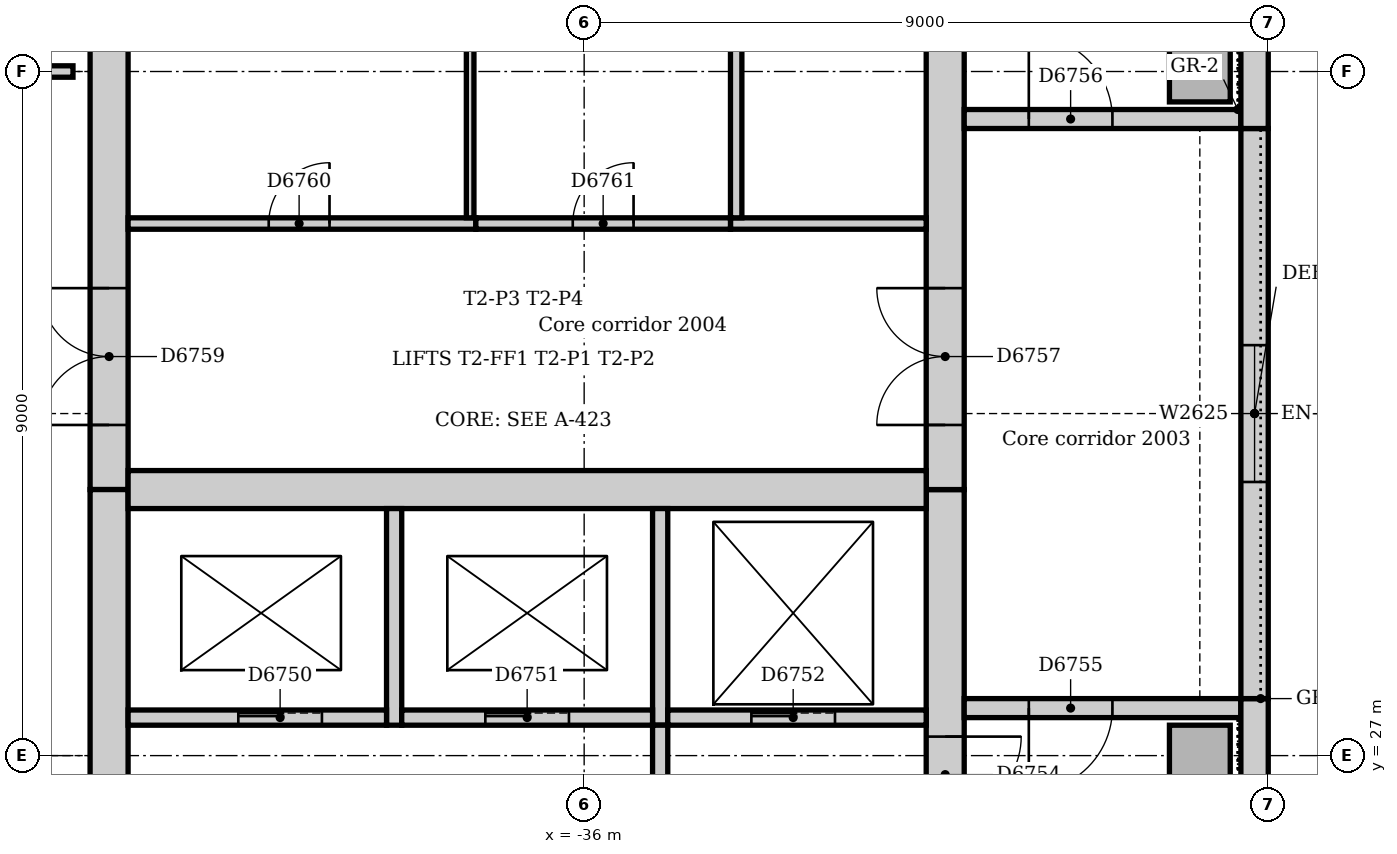
"""IFC4 building model, lengths in metres.
Left out: names, types, materials, properties, quantities, classifications, styles, units other than length and angle.
Written with IfcOpenShell. Run it as: python <this file> out.ifc"""

import sys

from ifc_helpers import new_model, si_unit, direction, frame, frame_2d, origin, origin_2d, place, context, subcontext, project, spatial, rectangle, extrude, element, fill, save


model = new_model("IFC4")
c1 = context("Model", 3, precision=1e-05, world=origin(), true_north=direction((0.0, 1.0)))
c2 = subcontext(c1, "Body", "Model", "MODEL_VIEW")
j1 = project(units=[si_unit("LENGTHUNIT", "METRE"), si_unit("PLANEANGLEUNIT", "RADIAN")], contexts=[c1])
p1 = place(None, origin())
s1 = spatial("IfcSite", under=j1, at=p1, CompositionType="ELEMENT")
p2 = place(p1, origin())
s2 = spatial("IfcBuilding", under=s1, at=p2, CompositionType="ELEMENT")
p3 = place(p2, frame((0.0, 0.0, 87.0)))
s3 = spatial("IfcBuildingStorey", under=s2, at=p3, CompositionType="ELEMENT", Elevation=87.0)
p4 = place(p3, frame((-31.25, 21.0, 0.0), z_axis=(0.0, 0.0, 1.0), x_axis=(0.0, 1.0, 0.0)))
e1 = element("IfcWall", 1, at=p4, inside=s3, PredefinedType="SOLIDWALL", context=c2, shape_type="SweptSolid", body=[
    extrude(rectangle(XDim=9.5, YDim=0.5, at=frame_2d((4.75, 0.0))), origin(), (0.0, 0.0, 1.0), 4.0),
])
p5 = place(p4, frame((5.25, 0.0, 0.0)))
e2 = element("IfcOpeningElement", 2, at=p5, cuts=e1, PredefinedType="OPENING", context=c2, shape_type="SweptSolid", body=[
    extrude(rectangle(XDim=1.0, YDim=2.1, at=frame_2d((0.5, 1.05))), frame((0.0, 0.26, 0.0), z_axis=(0.0, -1.0, 0.0), x_axis=(1.0, 0.0, 0.0)), (0.0, 0.0, 1.0), 0.52),
])
p6 = place(p3, frame((-31.25, 30.5, 0.0), z_axis=(0.0, 0.0, 1.0), x_axis=(0.0, 1.0, 0.0)))
e3 = element("IfcWall", 3, at=p6, inside=s3, PredefinedType="SOLIDWALL", context=c2, shape_type="SweptSolid", body=[
    extrude(rectangle(XDim=11.5, YDim=0.5, at=frame_2d((5.75, 0.0))), origin(), (0.0, 0.0, 1.0), 4.0),
])
p7 = place(p6, frame((0.85, 0.0, 0.0)))
e4 = element("IfcOpeningElement", 4, at=p7, cuts=e3, PredefinedType="OPENING", context=c2, shape_type="SweptSolid", body=[
    extrude(rectangle(XDim=1.8, YDim=2.1, at=frame_2d((0.9, 1.05))), frame((0.0, 0.26, 0.0), z_axis=(0.0, -1.0, 0.0), x_axis=(1.0, 0.0, 0.0)), (0.0, 0.0, 1.0), 0.52),
])
p8 = place(p3, frame((-42.25, 42.0, 0.0), z_axis=(0.0, 0.0, 1.0), x_axis=(0.0, -1.0, 0.0)))
e5 = element("IfcWall", 5, at=p8, inside=s3, PredefinedType="SOLIDWALL", context=c2, shape_type="SweptSolid", body=[
    extrude(rectangle(XDim=11.5, YDim=0.5, at=frame_2d((5.75, 0.0))), origin(), (0.0, 0.0, 1.0), 4.0),
])
p9 = place(p8, frame((8.85, 0.0, 0.0)))
e6 = element("IfcOpeningElement", 6, at=p9, cuts=e5, PredefinedType="OPENING", context=c2, shape_type="SweptSolid", body=[
    extrude(rectangle(XDim=1.8, YDim=2.1, at=frame_2d((0.9, 1.05))), frame((0.0, 0.26, 0.0), z_axis=(0.0, -1.0, 0.0), x_axis=(1.0, 0.0, 0.0)), (0.0, 0.0, 1.0), 0.52),
])
p10 = place(p3, frame((-42.25, 30.5, 0.0), z_axis=(0.0, 0.0, 1.0), x_axis=(0.0, -1.0, 0.0)))
e7 = element("IfcWall", 7, at=p10, inside=s3, PredefinedType="SOLIDWALL", context=c2, shape_type="SweptSolid", body=[
    extrude(rectangle(XDim=9.5, YDim=0.5, at=frame_2d((4.75, 0.0))), origin(), (0.0, 0.0, 1.0), 4.0),
])
p11 = place(p10, frame((3.85, 0.0, 0.0)))
e8 = element("IfcOpeningElement", 8, at=p11, cuts=e7, PredefinedType="OPENING", context=c2, shape_type="SweptSolid", body=[
    extrude(rectangle(XDim=1.8, YDim=2.1, at=frame_2d((0.9, 1.05))), frame((0.0, 0.26, 0.0), z_axis=(0.0, -1.0, 0.0), x_axis=(1.0, 0.0, 0.0)), (0.0, 0.0, 1.0), 0.52),
])
p12 = place(p3, frame((-42.0, 30.5, 0.0), z_axis=(0.0, 0.0, 1.0), x_axis=(1.0, 0.0, 0.0)))
e9 = element("IfcWall", 9, at=p12, inside=s3, PredefinedType="SOLIDWALL", context=c2, shape_type="SweptSolid", body=[
    extrude(rectangle(XDim=10.5, YDim=0.5, at=frame_2d((5.25, 0.0))), origin(), (0.0, 0.0, 1.0), 4.0),
])
p13 = place(p3, frame((-27.36, 27.625, 0.0), z_axis=(0.0, 0.0, 1.0), x_axis=(-1.0, 0.0, 0.0)))
e10 = element("IfcWall", 10, at=p13, inside=s3, PredefinedType="SOLIDWALL", context=c2, shape_type="SweptSolid", body=[
    extrude(rectangle(XDim=3.64, YDim=0.25, at=frame_2d((1.82, 0.0))), origin(), (0.0, 0.0, 1.0), 4.0),
])
p14 = place(p13, frame((1.69, 0.0, 0.0)))
e11 = element("IfcOpeningElement", 11, at=p14, cuts=e10, PredefinedType="OPENING", context=c2, shape_type="SweptSolid", body=[
    extrude(rectangle(XDim=1.1, YDim=2.1, at=frame_2d((0.55, 1.05))), frame((0.0, 0.135, 0.0), z_axis=(0.0, -1.0, 0.0), x_axis=(1.0, 0.0, 0.0)), (0.0, 0.0, 1.0), 0.27),
])
p15 = place(p3, frame((-31.0, 35.375, 0.0), z_axis=(0.0, 0.0, 1.0), x_axis=(1.0, 0.0, 0.0)))
e12 = element("IfcWall", 12, at=p15, inside=s3, PredefinedType="SOLIDWALL", context=c2, shape_type="SweptSolid", body=[
    extrude(rectangle(XDim=3.64, YDim=0.25, at=frame_2d((1.82, 0.0))), origin(), (0.0, 0.0, 1.0), 4.0),
])
p16 = place(p15, frame((0.85, 0.0, 0.0)))
e13 = element("IfcOpeningElement", 13, at=p16, cuts=e12, PredefinedType="OPENING", context=c2, shape_type="SweptSolid", body=[
    extrude(rectangle(XDim=1.1, YDim=2.1, at=frame_2d((0.55, 1.05))), frame((0.0, 0.135, 0.0), z_axis=(0.0, -1.0, 0.0), x_axis=(1.0, 0.0, 0.0)), (0.0, 0.0, 1.0), 0.27),
])
for number, where, z_axis, x_axis in (
    (14, (-27.9, 27.0, 0.0), (0.0, 0.0, 1.0), (1.0, 0.0, 0.0)),
    (15, (-27.9, 36.0, 0.0), (0.0, 0.0, 1.0), (1.0, 0.0, 0.0)),
):
    element("IfcColumn", number, at=place(p3, frame(where, z_axis=z_axis, x_axis=x_axis)), inside=s3, PredefinedType="COLUMN", context=c2, shape_type="SweptSolid", body=[
        extrude(rectangle(XDim=0.8, YDim=0.8, at=origin_2d()), origin(), (0.0, 0.0, 1.0), 4.0),
    ])
p17 = place(p3, frame((-27.18, 21.0, 0.0), z_axis=(0.0, 0.0, 1.0), x_axis=(0.0, 1.0, 0.0)))
e16 = element("IfcWall", 16, at=p17, inside=s3, PredefinedType="STANDARD", context=c2, shape_type="SweptSolid", body=[
    extrude(rectangle(XDim=6.75, YDim=0.36, at=frame_2d((3.375, 0.0))), origin(), (0.0, 0.0, 1.0), 3.85),
])
p18 = place(p3, frame((-27.18, 27.75, 0.0), z_axis=(0.0, 0.0, 1.0), x_axis=(0.0, 1.0, 0.0)))
e17 = element("IfcWall", 17, at=p18, inside=s3, PredefinedType="STANDARD", context=c2, shape_type="SweptSolid", body=[
    extrude(rectangle(XDim=7.5, YDim=0.36, at=frame_2d((3.75, 0.0))), origin(), (0.0, 0.0, 1.0), 3.85),
])
p19 = place(p18, frame((2.85, 0.0, 1.2)))
e18 = element("IfcOpeningElement", 18, at=p19, cuts=e17, PredefinedType="OPENING", context=c2, shape_type="SweptSolid", body=[
    extrude(rectangle(XDim=1.8, YDim=1.2, at=frame_2d((0.9, 0.6))), frame((0.0, 0.19, 0.0), z_axis=(0.0, -1.0, 0.0), x_axis=(1.0, 0.0, 0.0)), (0.0, 0.0, 1.0), 0.38),
])
p20 = place(p3, frame((-27.18, 35.25, 0.0), z_axis=(0.0, 0.0, 1.0), x_axis=(0.0, 1.0, 0.0)))
e19 = element("IfcWall", 19, at=p20, inside=s3, PredefinedType="STANDARD", context=c2, shape_type="SweptSolid", body=[
    extrude(rectangle(XDim=6.75, YDim=0.36, at=frame_2d((3.375, 0.0))), origin(), (0.0, 0.0, 1.0), 3.85),
])
p21 = place(p3, frame((-38.5, 27.4, 0.0), z_axis=(0.0, 0.0, 1.0), x_axis=(0.0, 1.0, 0.0)))
e20 = element("IfcWall", 20, at=p21, inside=s3, PredefinedType="SOLIDWALL", context=c2, shape_type="SweptSolid", body=[
    extrude(rectangle(XDim=2.85, YDim=0.2, at=frame_2d((1.425, 0.0))), origin(), (0.0, 0.0, 1.0), 4.0),
])
p22 = place(p3, frame((-42.0, 27.5, 0.0), z_axis=(0.0, 0.0, 1.0), x_axis=(1.0, 0.0, 0.0)))
e21 = element("IfcWall", 21, at=p22, inside=s3, PredefinedType="SOLIDWALL", context=c2, shape_type="SweptSolid", body=[
    extrude(rectangle(XDim=3.4, YDim=0.2, at=frame_2d((1.7, 0.0))), origin(), (0.0, 0.0, 1.0), 4.0),
])
p23 = place(p22, frame((1.45, 0.0, 0.0)))
e22 = element("IfcOpeningElement", 22, at=p23, cuts=e21, PredefinedType="OPENING", context=c2, shape_type="SweptSolid", body=[
    extrude(rectangle(XDim=1.1, YDim=2.1, at=frame_2d((0.55, 1.05))), frame((0.0, 0.11, 0.0), z_axis=(0.0, -1.0, 0.0), x_axis=(1.0, 0.0, 0.0)), (0.0, 0.0, 1.0), 0.22),
])
p24 = place(p3, frame((-35.0, 27.4, 0.0), z_axis=(0.0, 0.0, 1.0), x_axis=(0.0, 1.0, 0.0)))
e23 = element("IfcWall", 23, at=p24, inside=s3, PredefinedType="SOLIDWALL", context=c2, shape_type="SweptSolid", body=[
    extrude(rectangle(XDim=2.85, YDim=0.2, at=frame_2d((1.425, 0.0))), origin(), (0.0, 0.0, 1.0), 4.0),
])
p25 = place(p3, frame((-38.4, 27.5, 0.0), z_axis=(0.0, 0.0, 1.0), x_axis=(1.0, 0.0, 0.0)))
e24 = element("IfcWall", 24, at=p25, inside=s3, PredefinedType="SOLIDWALL", context=c2, shape_type="SweptSolid", body=[
    extrude(rectangle(XDim=3.3, YDim=0.2, at=frame_2d((1.65, 0.0))), origin(), (0.0, 0.0, 1.0), 4.0),
])
p26 = place(p25, frame((1.1, 0.0, 0.0)))
e25 = element("IfcOpeningElement", 25, at=p26, cuts=e24, PredefinedType="OPENING", context=c2, shape_type="SweptSolid", body=[
    extrude(rectangle(XDim=1.1, YDim=2.1, at=frame_2d((0.55, 1.05))), frame((0.0, 0.11, 0.0), z_axis=(0.0, -1.0, 0.0), x_axis=(1.0, 0.0, 0.0)), (0.0, 0.0, 1.0), 0.22),
])
p27 = place(p3, frame((-34.9, 27.5, 0.0), z_axis=(0.0, 0.0, 1.0), x_axis=(1.0, 0.0, 0.0)))
e26 = element("IfcWall", 26, at=p27, inside=s3, PredefinedType="SOLIDWALL", context=c2, shape_type="SweptSolid", body=[
    extrude(rectangle(XDim=3.4, YDim=0.2, at=frame_2d((1.7, 0.0))), origin(), (0.0, 0.0, 1.0), 4.0),
])
p28 = place(p27, frame((1.1, 0.0, 0.0)))
e27 = element("IfcOpeningElement", 27, at=p28, cuts=e26, PredefinedType="OPENING", context=c2, shape_type="SweptSolid", body=[
    extrude(rectangle(XDim=1.1, YDim=2.1, at=frame_2d((0.55, 1.05))), frame((0.0, 0.11, 0.0), z_axis=(0.0, -1.0, 0.0), x_axis=(1.0, 0.0, 0.0)), (0.0, 0.0, 1.0), 0.22),
])
p29 = place(p3, frame((-35.0, 24.1, 0.0), z_axis=(0.0, 0.0, 1.0), x_axis=(0.0, 1.0, 0.0)))
e28 = element("IfcWall", 28, at=p29, inside=s3, PredefinedType="SOLIDWALL", context=c2, shape_type="SweptSolid", body=[
    extrude(rectangle(XDim=3.3, YDim=0.2, at=frame_2d((1.65, 0.0))), origin(), (0.0, 0.0, 1.0), 4.0),
])
p30 = place(p29, frame((1.15, 0.0, 0.0)))
e29 = element("IfcOpeningElement", 29, at=p30, cuts=e28, PredefinedType="OPENING", context=c2, shape_type="SweptSolid", body=[
    extrude(rectangle(XDim=1.0, YDim=2.1, at=frame_2d((0.5, 1.05))), frame((0.0, 0.11, 0.0), z_axis=(0.0, -1.0, 0.0), x_axis=(1.0, 0.0, 0.0)), (0.0, 0.0, 1.0), 0.22),
])
p31 = place(p3, frame((-34.075, 34.0, 0.0), z_axis=(0.0, 0.0, 1.0), x_axis=(1.0, 0.0, 0.0)))
e30 = element("IfcWall", 30, at=p31, inside=s3, PredefinedType="SOLIDWALL", context=c2, shape_type="SweptSolid", body=[
    extrude(rectangle(XDim=2.575, YDim=0.15, at=frame_2d((1.288, 0.0))), origin(), (0.0, 0.0, 1.0), 4.0),
])
p32 = place(p3, frame((-34.0, 41.075, 0.0), z_axis=(0.0, 0.0, 1.0), x_axis=(0.0, -1.0, 0.0)))
e31 = element("IfcWall", 31, at=p32, inside=s3, PredefinedType="SOLIDWALL", context=c2, shape_type="SweptSolid", body=[
    extrude(rectangle(XDim=7.0, YDim=0.15, at=frame_2d((3.5, 0.0))), origin(), (0.0, 0.0, 1.0), 4.0),
])
p33 = place(p3, frame((-37.425, 34.0, 0.0), z_axis=(0.0, 0.0, 1.0), x_axis=(-1.0, 0.0, 0.0)))
e32 = element("IfcWall", 32, at=p33, inside=s3, PredefinedType="PARTITIONING", context=c2, shape_type="SweptSolid", body=[
    extrude(rectangle(XDim=4.575, YDim=0.15, at=frame_2d((2.288, 0.0))), origin(), (0.0, 0.0, 1.0), 3.85),
])
p34 = place(p33, frame((1.925, 0.0, 0.0)))
e33 = element("IfcOpeningElement", 33, at=p34, cuts=e32, PredefinedType="OPENING", context=c2, shape_type="SweptSolid", body=[
    extrude(rectangle(XDim=0.8, YDim=2.1, at=frame_2d((0.4, 1.05))), frame((0.0, 0.085, 0.0), z_axis=(0.0, -1.0, 0.0), x_axis=(1.0, 0.0, 0.0)), (0.0, 0.0, 1.0), 0.17),
])
p35 = place(p3, frame((-34.075, 34.0, 0.0), z_axis=(0.0, 0.0, 1.0), x_axis=(-1.0, 0.0, 0.0)))
e34 = element("IfcWall", 34, at=p35, inside=s3, PredefinedType="PARTITIONING", context=c2, shape_type="SweptSolid", body=[
    extrude(rectangle(XDim=3.35, YDim=0.15, at=frame_2d((1.675, 0.0))), origin(), (0.0, 0.0, 1.0), 3.85),
])
p36 = place(p35, frame((1.275, 0.0, 0.0)))
e35 = element("IfcOpeningElement", 35, at=p36, cuts=e34, PredefinedType="OPENING", context=c2, shape_type="SweptSolid", body=[
    extrude(rectangle(XDim=0.8, YDim=2.1, at=frame_2d((0.4, 1.05))), frame((0.0, 0.085, 0.0), z_axis=(0.0, -1.0, 0.0), x_axis=(1.0, 0.0, 0.0)), (0.0, 0.0, 1.0), 0.17),
])
p37 = place(p3, frame((-37.5, 34.075, 0.0), z_axis=(0.0, 0.0, 1.0), x_axis=(0.0, 1.0, 0.0)))
e36 = element("IfcWall", 36, at=p37, inside=s3, PredefinedType="PARTITIONING", context=c2, shape_type="SweptSolid", body=[
    extrude(rectangle(XDim=7.925, YDim=0.1, at=frame_2d((3.962, 0.0))), origin(), (0.0, 0.0, 1.0), 3.85),
])
p38 = place(p3, frame((-44.65, 36.0, 0.0), z_axis=(0.0, 0.0, 1.0), x_axis=(1.0, 0.0, 0.0)))
e37 = element("IfcWall", 37, at=p38, inside=s3, PredefinedType="PARTITIONING", context=c2, shape_type="SweptSolid", body=[
    extrude(rectangle(XDim=1.925, YDim=0.15, at=frame_2d((0.963, 0.0))), origin(), (0.0, 0.0, 1.0), 3.602),
])
p39 = place(p38, frame((0.5, 0.0, 0.0)))
e38 = element("IfcOpeningElement", 38, at=p39, cuts=e37, PredefinedType="OPENING", context=c2, shape_type="SweptSolid", body=[
    extrude(rectangle(XDim=0.9, YDim=2.1, at=frame_2d((0.45, 1.05))), frame((0.0, 0.085, 0.0), z_axis=(0.0, -1.0, 0.0), x_axis=(1.0, 0.0, 0.0)), (0.0, 0.0, 1.0), 0.17),
])
p40 = place(p19, origin())
e39 = element("IfcWindow", 39, at=p40, inside=s3, PartitioningType="SINGLE_PANEL", PredefinedType="WINDOW", context=c2, shape_type="SweptSolid", body=[
    extrude(rectangle(XDim=1.8, YDim=1.2, at=frame_2d((0.9, 0.6))), frame((0.0, 0.13, 0.0), z_axis=(0.0, -1.0, 0.0), x_axis=(1.0, 0.0, 0.0)), (0.0, 0.0, 1.0), 0.06),
])
fill(e18, e39)
p41 = place(p23, origin())
e40 = element("IfcDoor", 40, at=p41, inside=s3, OperationType="SLIDING_TO_LEFT", PredefinedType="DOOR", context=c2, shape_type="SweptSolid", body=[
    extrude(rectangle(XDim=1.1, YDim=2.1, at=frame_2d((0.55, 1.05))), frame((0.0, 0.025, 0.0), z_axis=(0.0, -1.0, 0.0), x_axis=(1.0, 0.0, 0.0)), (0.0, 0.0, 1.0), 0.05),
])
fill(e22, e40)
p42 = place(p26, origin())
e41 = element("IfcDoor", 41, at=p42, inside=s3, OperationType="SLIDING_TO_LEFT", PredefinedType="DOOR", context=c2, shape_type="SweptSolid", body=[
    extrude(rectangle(XDim=1.1, YDim=2.1, at=frame_2d((0.55, 1.05))), frame((0.0, 0.025, 0.0), z_axis=(0.0, -1.0, 0.0), x_axis=(1.0, 0.0, 0.0)), (0.0, 0.0, 1.0), 0.05),
])
fill(e25, e41)
p43 = place(p28, origin())
e42 = element("IfcDoor", 42, at=p43, inside=s3, OperationType="SLIDING_TO_LEFT", PredefinedType="DOOR", context=c2, shape_type="SweptSolid", body=[
    extrude(rectangle(XDim=1.1, YDim=2.1, at=frame_2d((0.55, 1.05))), frame((0.0, 0.025, 0.0), z_axis=(0.0, -1.0, 0.0), x_axis=(1.0, 0.0, 0.0)), (0.0, 0.0, 1.0), 0.05),
])
fill(e27, e42)
p44 = place(p5, frame((1.0, 0.0, 0.0), z_axis=(0.0, 0.0, 1.0), x_axis=(-1.0, 0.0, 0.0)))
e43 = element("IfcDoor", 43, at=p44, inside=s3, OperationType="SINGLE_SWING_LEFT", PredefinedType="DOOR", context=c2, shape_type="SweptSolid", body=[
    extrude(rectangle(XDim=1.0, YDim=2.1, at=frame_2d((0.5, 1.05))), frame((0.0, 0.025, 0.0), z_axis=(0.0, -1.0, 0.0), x_axis=(1.0, 0.0, 0.0)), (0.0, 0.0, 1.0), 0.05),
])
fill(e2, e43)
p45 = place(p14, origin())
e44 = element("IfcDoor", 44, at=p45, inside=s3, OperationType="SINGLE_SWING_RIGHT", PredefinedType="DOOR", context=c2, shape_type="SweptSolid", body=[
    extrude(rectangle(XDim=1.1, YDim=2.1, at=frame_2d((0.55, 1.05))), frame((0.0, 0.025, 0.0), z_axis=(0.0, -1.0, 0.0), x_axis=(1.0, 0.0, 0.0)), (0.0, 0.0, 1.0), 0.05),
])
fill(e11, e44)
p46 = place(p16, origin())
e45 = element("IfcDoor", 45, at=p46, inside=s3, OperationType="SINGLE_SWING_LEFT", PredefinedType="DOOR", context=c2, shape_type="SweptSolid", body=[
    extrude(rectangle(XDim=1.1, YDim=2.1, at=frame_2d((0.55, 1.05))), frame((0.0, 0.025, 0.0), z_axis=(0.0, -1.0, 0.0), x_axis=(1.0, 0.0, 0.0)), (0.0, 0.0, 1.0), 0.05),
])
fill(e13, e45)
p47 = place(p7, origin())
e46 = element("IfcDoor", 46, at=p47, inside=s3, OperationType="DOUBLE_DOOR_SINGLE_SWING", PredefinedType="DOOR", context=c2, shape_type="SweptSolid", body=[
    extrude(rectangle(XDim=1.8, YDim=2.1, at=frame_2d((0.9, 1.05))), frame((0.0, 0.025, 0.0), z_axis=(0.0, -1.0, 0.0), x_axis=(1.0, 0.0, 0.0)), (0.0, 0.0, 1.0), 0.05),
])
fill(e4, e46)
p48 = place(p9, frame((1.8, 0.0, 0.0), z_axis=(0.0, 0.0, 1.0), x_axis=(-1.0, 0.0, 0.0)))
e47 = element("IfcDoor", 47, at=p48, inside=s3, OperationType="DOUBLE_DOOR_SINGLE_SWING", PredefinedType="DOOR", context=c2, shape_type="SweptSolid", body=[
    extrude(rectangle(XDim=1.8, YDim=2.1, at=frame_2d((0.9, 1.05))), frame((0.0, 0.025, 0.0), z_axis=(0.0, -1.0, 0.0), x_axis=(1.0, 0.0, 0.0)), (0.0, 0.0, 1.0), 0.05),
])
fill(e6, e47)
p49 = place(p34, frame((0.8, 0.0, 0.0), z_axis=(0.0, 0.0, 1.0), x_axis=(-1.0, 0.0, 0.0)))
e48 = element("IfcDoor", 48, at=p49, inside=s3, OperationType="SINGLE_SWING_RIGHT", PredefinedType="DOOR", context=c2, shape_type="SweptSolid", body=[
    extrude(rectangle(XDim=0.8, YDim=2.1, at=frame_2d((0.4, 1.05))), frame((0.0, 0.025, 0.0), z_axis=(0.0, -1.0, 0.0), x_axis=(1.0, 0.0, 0.0)), (0.0, 0.0, 1.0), 0.05),
])
fill(e33, e48)
p50 = place(p36, frame((0.8, 0.0, 0.0), z_axis=(0.0, 0.0, 1.0), x_axis=(-1.0, 0.0, 0.0)))
e49 = element("IfcDoor", 49, at=p50, inside=s3, OperationType="SINGLE_SWING_RIGHT", PredefinedType="DOOR", context=c2, shape_type="SweptSolid", body=[
    extrude(rectangle(XDim=0.8, YDim=2.1, at=frame_2d((0.4, 1.05))), frame((0.0, 0.025, 0.0), z_axis=(0.0, -1.0, 0.0), x_axis=(1.0, 0.0, 0.0)), (0.0, 0.0, 1.0), 0.05),
])
fill(e35, e49)
save(model, sys.argv[1])
